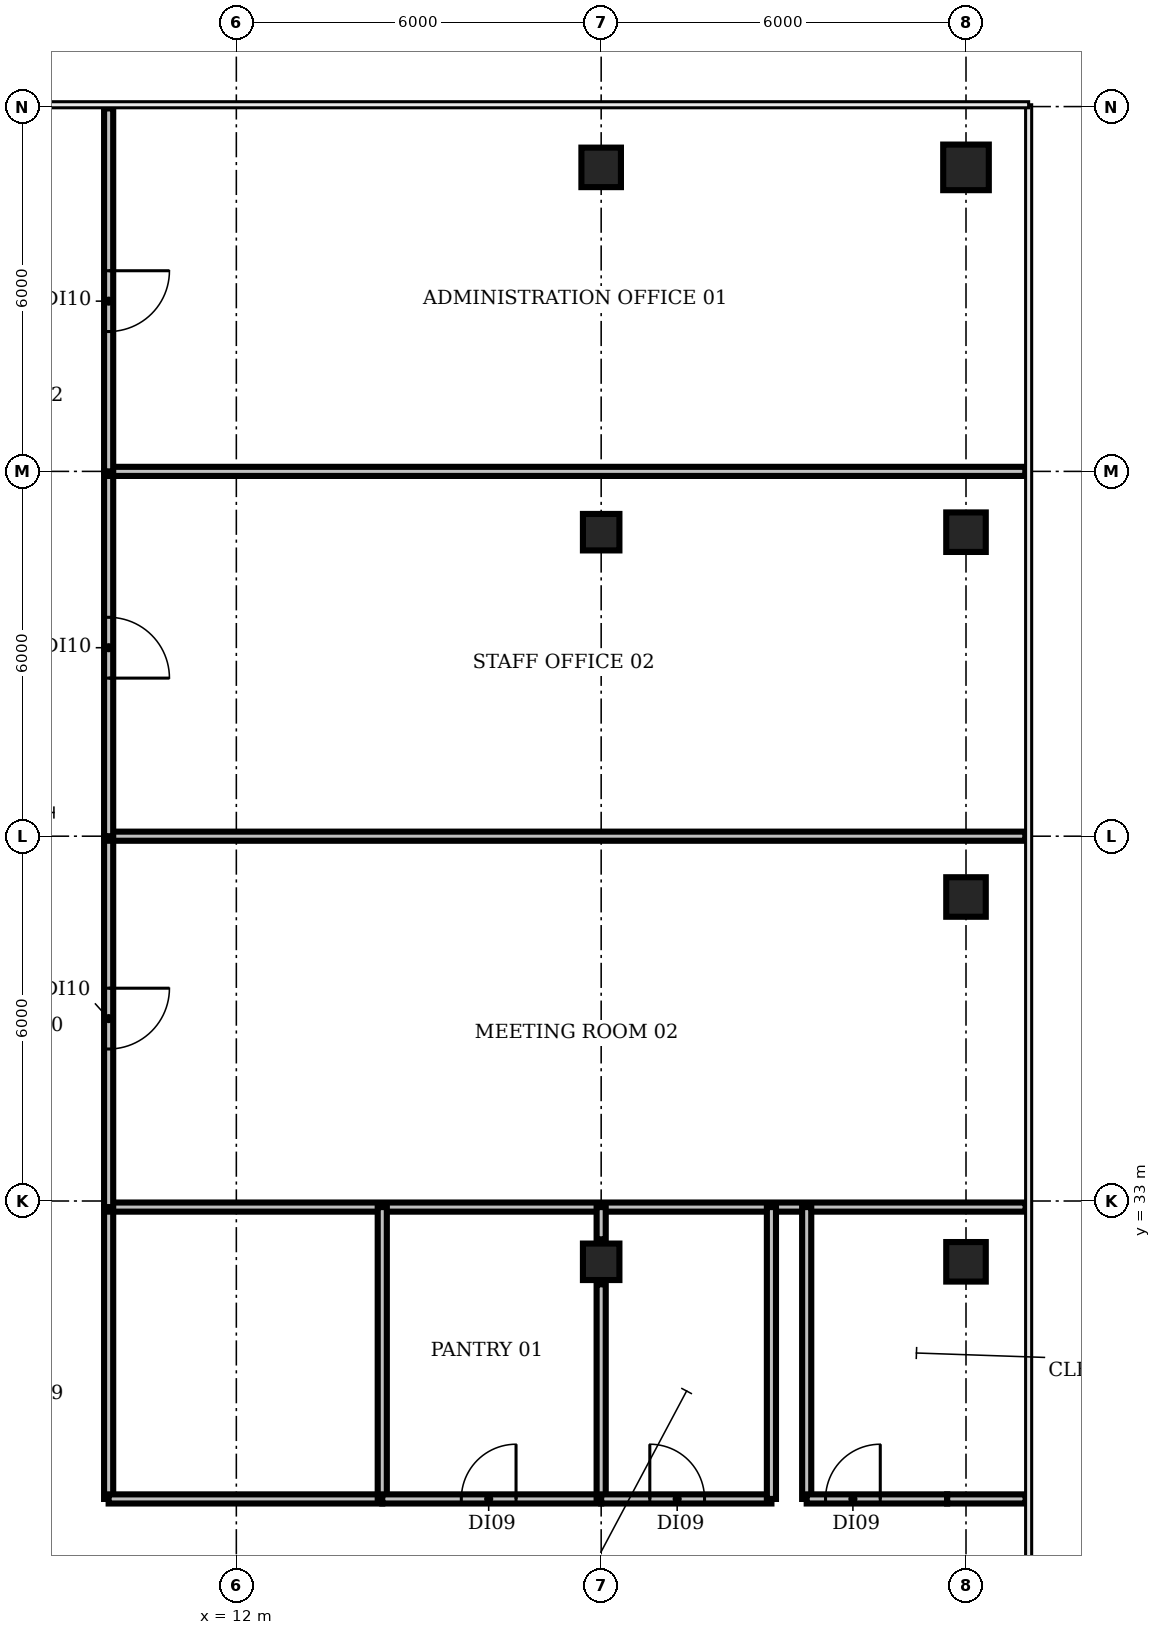
"""IFC4 building model, lengths in metres.
Left out: names, types, materials, properties, quantities, classifications, styles, units other than length and angle.
Written with IfcOpenShell. Run it as: python <this file> out.ifc"""

import sys

from ifc_helpers import new_model, si_unit, direction, frame, frame_2d, origin, origin_2d, place, context, subcontext, project, spatial, rectangle, circle, extrude, element, fill, save


model = new_model("IFC4")
c1 = context("Model", 3, precision=1e-05, world=origin(), true_north=direction((0.0, 1.0)))
c2 = subcontext(c1, "Body", "Model", "MODEL_VIEW")
j1 = project(units=[si_unit("LENGTHUNIT", "METRE"), si_unit("PLANEANGLEUNIT", "RADIAN")], contexts=[c1])
p1 = place(None, origin())
s1 = spatial("IfcSite", under=j1, at=p1, CompositionType="ELEMENT")
p2 = place(p1, origin())
s2 = spatial("IfcBuilding", under=s1, at=p2, CompositionType="ELEMENT")
p3 = place(p2, frame((0.0, 0.0, 318.8)))
s3 = spatial("IfcBuildingStorey", under=s2, at=p3, CompositionType="ELEMENT", Elevation=318.8)
for number, where, z_axis, x_axis in (
    (1, (18.0, 32.0, 0.0), (0.0, 0.0, 1.0), (1.0, 0.0, 0.0)),
    (2, (18.0, 44.0, 0.0), (0.0, 0.0, 1.0), (1.0, 0.0, 0.0)),
):
    element("IfcColumn", number, at=place(p3, frame(where, z_axis=z_axis, x_axis=x_axis)), inside=s3, PredefinedType="COLUMN", context=c2, shape_type="SweptSolid", body=[
        extrude(rectangle(XDim=0.6, YDim=0.6, at=origin_2d()), origin(), (0.0, 0.0, 1.0), 3.9),
    ])
for number, where, z_axis, x_axis in (
    (3, (18.0, 50.0, 0.0), (0.0, 0.0, 1.0), (1.0, 0.0, 0.0)),
    (4, (24.0, 32.0, 0.0), (0.0, 0.0, 1.0), (1.0, 0.0, 0.0)),
    (5, (24.0, 38.0, 0.0), (0.0, 0.0, 1.0), (1.0, 0.0, 0.0)),
    (6, (24.0, 44.0, 0.0), (0.0, 0.0, 1.0), (1.0, 0.0, 0.0)),
):
    element("IfcColumn", number, at=place(p3, frame(where, z_axis=z_axis, x_axis=x_axis)), inside=s3, PredefinedType="COLUMN", context=c2, shape_type="SweptSolid", body=[
        extrude(rectangle(XDim=0.65, YDim=0.65, at=origin_2d()), origin(), (0.0, 0.0, 1.0), 3.9),
    ])
p4 = place(p3, frame((24.0, 50.0, 0.0), z_axis=(0.0, 0.0, 1.0), x_axis=(1.0, 0.0, 0.0)))
e7 = element("IfcColumn", 7, at=p4, inside=s3, PredefinedType="COLUMN", context=c2, shape_type="SweptSolid", body=[
    extrude(circle(Radius=0.375, at=origin_2d()), origin(), (0.0, 0.0, 1.0), 3.9),
])
p5 = place(p3, frame((9.9, 28.1, 0.0), z_axis=(0.0, 0.0, 1.0), x_axis=(0.0, 1.0, 0.0)))
e8 = element("IfcWall", 8, at=p5, inside=s3, PredefinedType="PARTITIONING", context=c2, shape_type="SweptSolid", body=[
    extrude(rectangle(XDim=4.8, YDim=0.15, at=frame_2d((2.4, 0.0))), origin(), (0.0, 0.0, 1.0), 2.95),
])
p6 = place(p3, frame((9.9, 28.1, 0.0), z_axis=(0.0, 0.0, 1.0), x_axis=(1.0, 0.0, 0.0)))
e9 = element("IfcWall", 9, at=p6, inside=s3, PredefinedType="PARTITIONING", context=c2, shape_type="SweptSolid", body=[
    extrude(rectangle(XDim=4.5, YDim=0.15, at=frame_2d((2.25, 0.0))), origin(), (0.0, 0.0, 1.0), 2.95),
])
p7 = place(p3, frame((9.9, 32.9, 0.0), z_axis=(0.0, 0.0, 1.0), x_axis=(1.0, 0.0, 0.0)))
e10 = element("IfcWall", 10, at=p7, inside=s3, PredefinedType="PARTITIONING", context=c2, shape_type="SweptSolid", body=[
    extrude(rectangle(XDim=15.08, YDim=0.15, at=frame_2d((7.54, 0.0))), origin(), (0.0, 0.0, 1.0), 2.95),
])
p8 = place(p3, frame((9.9, 39.0, 0.0), z_axis=(0.0, 0.0, 1.0), x_axis=(0.0, -1.0, 0.0)))
e11 = element("IfcWall", 11, at=p8, inside=s3, PredefinedType="PARTITIONING", context=c2, shape_type="SweptSolid", body=[
    extrude(rectangle(XDim=6.1, YDim=0.15, at=frame_2d((3.05, 0.0))), origin(), (0.0, 0.0, 1.0), 2.95),
])
p9 = place(p8, frame((2.5, 0.0, 0.0)))
e12 = element("IfcOpeningElement", 12, at=p9, cuts=e11, PredefinedType="OPENING", context=c2, shape_type="SweptSolid", body=[
    extrude(rectangle(XDim=1.0, YDim=2.1, at=frame_2d((0.5, 1.05))), frame((0.0, 0.085, 0.0), z_axis=(0.0, -1.0, 0.0), x_axis=(1.0, 0.0, 0.0)), (0.0, 0.0, 1.0), 0.17),
])
p10 = place(p3, frame((9.9, 39.0, 0.0), z_axis=(0.0, 0.0, 1.0), x_axis=(1.0, 0.0, 0.0)))
e13 = element("IfcWall", 13, at=p10, inside=s3, PredefinedType="PARTITIONING", context=c2, shape_type="SweptSolid", body=[
    extrude(rectangle(XDim=15.075, YDim=0.15, at=frame_2d((7.538, 0.0))), origin(), (0.0, 0.0, 1.0), 2.95),
])
p11 = place(p3, frame((9.9, 45.0, 0.0), z_axis=(0.0, 0.0, 1.0), x_axis=(0.0, -1.0, 0.0)))
e14 = element("IfcWall", 14, at=p11, inside=s3, PredefinedType="PARTITIONING", context=c2, shape_type="SweptSolid", body=[
    extrude(rectangle(XDim=6.0, YDim=0.15, at=frame_2d((3.0, 0.0))), origin(), (0.0, 0.0, 1.0), 2.95),
])
p12 = place(p11, frame((2.4, 0.0, 0.0)))
e15 = element("IfcOpeningElement", 15, at=p12, cuts=e14, PredefinedType="OPENING", context=c2, shape_type="SweptSolid", body=[
    extrude(rectangle(XDim=1.0, YDim=2.1, at=frame_2d((0.5, 1.05))), frame((0.0, 0.085, 0.0), z_axis=(0.0, -1.0, 0.0), x_axis=(1.0, 0.0, 0.0)), (0.0, 0.0, 1.0), 0.17),
])
p13 = place(p3, frame((9.9, 45.0, 0.0), z_axis=(0.0, 0.0, 1.0), x_axis=(1.0, 0.0, 0.0)))
e16 = element("IfcWall", 16, at=p13, inside=s3, PredefinedType="PARTITIONING", context=c2, shape_type="SweptSolid", body=[
    extrude(rectangle(XDim=15.075, YDim=0.15, at=frame_2d((7.538, 0.0))), origin(), (0.0, 0.0, 1.0), 2.95),
])
p14 = place(p3, frame((9.9, 50.97, 0.0), z_axis=(0.0, 0.0, 1.0), x_axis=(0.0, -1.0, 0.0)))
e17 = element("IfcWall", 17, at=p14, inside=s3, PredefinedType="PARTITIONING", context=c2, shape_type="SweptSolid", body=[
    extrude(rectangle(XDim=5.97, YDim=0.15, at=frame_2d((2.985, 0.0))), origin(), (0.0, 0.0, 1.0), 2.95),
])
p15 = place(p14, frame((2.67, 0.0, 0.0)))
e18 = element("IfcOpeningElement", 18, at=p15, cuts=e17, PredefinedType="OPENING", context=c2, shape_type="SweptSolid", body=[
    extrude(rectangle(XDim=1.0, YDim=2.1, at=frame_2d((0.5, 1.05))), frame((0.0, 0.085, 0.0), z_axis=(0.0, -1.0, 0.0), x_axis=(1.0, 0.0, 0.0)), (0.0, 0.0, 1.0), 0.17),
])
p16 = place(p3, frame((14.4, 28.1, 0.0), z_axis=(0.0, 0.0, 1.0), x_axis=(0.0, 1.0, 0.0)))
e19 = element("IfcWall", 19, at=p16, inside=s3, PredefinedType="PARTITIONING", context=c2, shape_type="SweptSolid", body=[
    extrude(rectangle(XDim=4.8, YDim=0.15, at=frame_2d((2.4, 0.0))), origin(), (0.0, 0.0, 1.0), 2.95),
])
p17 = place(p3, frame((14.4, 28.1, 0.0), z_axis=(0.0, 0.0, 1.0), x_axis=(1.0, 0.0, 0.0)))
e20 = element("IfcWall", 20, at=p17, inside=s3, PredefinedType="PARTITIONING", context=c2, shape_type="SweptSolid", body=[
    extrude(rectangle(XDim=3.6, YDim=0.15, at=frame_2d((1.8, 0.0))), origin(), (0.0, 0.0, 1.0), 2.95),
])
p18 = place(p17, frame((1.3, 0.0, 0.0)))
e21 = element("IfcOpeningElement", 21, at=p18, cuts=e20, PredefinedType="OPENING", context=c2, shape_type="SweptSolid", body=[
    extrude(rectangle(XDim=0.9, YDim=2.1, at=frame_2d((0.45, 1.05))), frame((0.0, 0.085, 0.0), z_axis=(0.0, -1.0, 0.0), x_axis=(1.0, 0.0, 0.0)), (0.0, 0.0, 1.0), 0.17),
])
p19 = place(p3, frame((18.0, 28.1, 0.0), z_axis=(0.0, 0.0, 1.0), x_axis=(0.0, 1.0, 0.0)))
e22 = element("IfcWall", 22, at=p19, inside=s3, PredefinedType="PARTITIONING", context=c2, shape_type="SweptSolid", body=[
    extrude(rectangle(XDim=3.53, YDim=0.15, at=frame_2d((1.765, 0.0))), origin(), (0.0, 0.0, 1.0), 2.95),
])
p20 = place(p3, frame((18.0, 28.1, 0.0), z_axis=(0.0, 0.0, 1.0), x_axis=(1.0, 0.0, 0.0)))
e23 = element("IfcWall", 23, at=p20, inside=s3, PredefinedType="PARTITIONING", context=c2, shape_type="SweptSolid", body=[
    extrude(rectangle(XDim=2.8, YDim=0.15, at=frame_2d((1.4, 0.0))), origin(), (0.0, 0.0, 1.0), 2.95),
])
p21 = place(p20, frame((0.8, 0.0, 0.0)))
e24 = element("IfcOpeningElement", 24, at=p21, cuts=e23, PredefinedType="OPENING", context=c2, shape_type="SweptSolid", body=[
    extrude(rectangle(XDim=0.9, YDim=2.1, at=frame_2d((0.45, 1.05))), frame((0.0, 0.085, 0.0), z_axis=(0.0, -1.0, 0.0), x_axis=(1.0, 0.0, 0.0)), (0.0, 0.0, 1.0), 0.17),
])
p22 = place(p3, frame((18.0, 31.736, 0.0), z_axis=(0.0, 0.0, 1.0), x_axis=(0.0, 1.0, 0.0)))
e25 = element("IfcWall", 25, at=p22, inside=s3, PredefinedType="PARTITIONING", context=c2, shape_type="SweptSolid", body=[
    extrude(rectangle(XDim=0.529, YDim=0.15, at=frame_2d((0.264, 0.0))), origin(), (0.0, 0.0, 1.0), 2.95),
])
p23 = place(p3, frame((18.0, 32.37, 0.0), z_axis=(0.0, 0.0, 1.0), x_axis=(0.0, 1.0, 0.0)))
e26 = element("IfcWall", 26, at=p23, inside=s3, PredefinedType="PARTITIONING", context=c2, shape_type="SweptSolid", body=[
    extrude(rectangle(XDim=0.53, YDim=0.15, at=frame_2d((0.265, 0.0))), origin(), (0.0, 0.0, 1.0), 2.95),
])
for number, where, z_axis, x_axis in (
    (27, (20.8, 28.1, 0.0), (0.0, 0.0, 1.0), (0.0, 1.0, 0.0)),
    (28, (21.38, 28.1, 0.0), (0.0, 0.0, 1.0), (0.0, 1.0, 0.0)),
):
    element("IfcWall", number, at=place(p3, frame(where, z_axis=z_axis, x_axis=x_axis)), inside=s3, PredefinedType="PARTITIONING", context=c2, shape_type="SweptSolid", body=[
        extrude(rectangle(XDim=4.8, YDim=0.15, at=frame_2d((2.4, 0.0))), origin(), (0.0, 0.0, 1.0), 2.95),
    ])
p24 = place(p3, frame((21.38, 28.1, 0.0), z_axis=(0.0, 0.0, 1.0), x_axis=(1.0, 0.0, 0.0)))
e29 = element("IfcWall", 29, at=p24, inside=s3, PredefinedType="PARTITIONING", context=c2, shape_type="SweptSolid", body=[
    extrude(rectangle(XDim=2.31, YDim=0.15, at=frame_2d((1.155, 0.0))), origin(), (0.0, 0.0, 1.0), 2.95),
])
p25 = place(p24, frame((0.31, 0.0, 0.0)))
e30 = element("IfcOpeningElement", 30, at=p25, cuts=e29, PredefinedType="OPENING", context=c2, shape_type="SweptSolid", body=[
    extrude(rectangle(XDim=0.9, YDim=2.1, at=frame_2d((0.45, 1.05))), frame((0.0, 0.085, 0.0), z_axis=(0.0, -1.0, 0.0), x_axis=(1.0, 0.0, 0.0)), (0.0, 0.0, 1.0), 0.17),
])
p26 = place(p3, frame((23.69, 28.1, 0.0), z_axis=(0.0, 0.0, 1.0), x_axis=(1.0, 0.0, 0.0)))
e31 = element("IfcWall", 31, at=p26, inside=s3, PredefinedType="PARTITIONING", context=c2, shape_type="SweptSolid", body=[
    extrude(rectangle(XDim=1.29, YDim=0.15, at=frame_2d((0.645, 0.0))), origin(), (0.0, 0.0, 1.0), 2.95),
])
p27 = place(p9, origin())
e32 = element("IfcDoor", 32, at=p27, inside=s3, OperationType="SINGLE_SWING_LEFT", PredefinedType="DOOR", context=c2, shape_type="SweptSolid", body=[
    extrude(rectangle(XDim=1.0, YDim=2.1, at=frame_2d((0.5, 1.05))), frame((0.0, 0.025, 0.0), z_axis=(0.0, -1.0, 0.0), x_axis=(1.0, 0.0, 0.0)), (0.0, 0.0, 1.0), 0.05),
])
fill(e12, e32)
p28 = place(p12, origin())
e33 = element("IfcDoor", 33, at=p28, inside=s3, OperationType="SINGLE_SWING_RIGHT", PredefinedType="DOOR", context=c2, shape_type="SweptSolid", body=[
    extrude(rectangle(XDim=1.0, YDim=2.1, at=frame_2d((0.5, 1.05))), frame((0.0, 0.025, 0.0), z_axis=(0.0, -1.0, 0.0), x_axis=(1.0, 0.0, 0.0)), (0.0, 0.0, 1.0), 0.05),
])
fill(e15, e33)
p29 = place(p15, origin())
e34 = element("IfcDoor", 34, at=p29, inside=s3, OperationType="SINGLE_SWING_LEFT", PredefinedType="DOOR", context=c2, shape_type="SweptSolid", body=[
    extrude(rectangle(XDim=1.0, YDim=2.1, at=frame_2d((0.5, 1.05))), frame((0.0, 0.025, 0.0), z_axis=(0.0, -1.0, 0.0), x_axis=(1.0, 0.0, 0.0)), (0.0, 0.0, 1.0), 0.05),
])
fill(e18, e34)
p30 = place(p18, origin())
e35 = element("IfcDoor", 35, at=p30, inside=s3, OperationType="SINGLE_SWING_RIGHT", PredefinedType="DOOR", context=c2, shape_type="SweptSolid", body=[
    extrude(rectangle(XDim=0.9, YDim=2.1, at=frame_2d((0.45, 1.05))), frame((0.0, 0.025, 0.0), z_axis=(0.0, -1.0, 0.0), x_axis=(1.0, 0.0, 0.0)), (0.0, 0.0, 1.0), 0.05),
])
fill(e21, e35)
p31 = place(p21, origin())
e36 = element("IfcDoor", 36, at=p31, inside=s3, OperationType="SINGLE_SWING_LEFT", PredefinedType="DOOR", context=c2, shape_type="SweptSolid", body=[
    extrude(rectangle(XDim=0.9, YDim=2.1, at=frame_2d((0.45, 1.05))), frame((0.0, 0.025, 0.0), z_axis=(0.0, -1.0, 0.0), x_axis=(1.0, 0.0, 0.0)), (0.0, 0.0, 1.0), 0.05),
])
fill(e24, e36)
p32 = place(p25, origin())
e37 = element("IfcDoor", 37, at=p32, inside=s3, OperationType="SINGLE_SWING_RIGHT", PredefinedType="DOOR", context=c2, shape_type="SweptSolid", body=[
    extrude(rectangle(XDim=0.9, YDim=2.1, at=frame_2d((0.45, 1.05))), frame((0.0, 0.025, 0.0), z_axis=(0.0, -1.0, 0.0), x_axis=(1.0, 0.0, 0.0)), (0.0, 0.0, 1.0), 0.05),
])
fill(e30, e37)
save(model, sys.argv[1])
